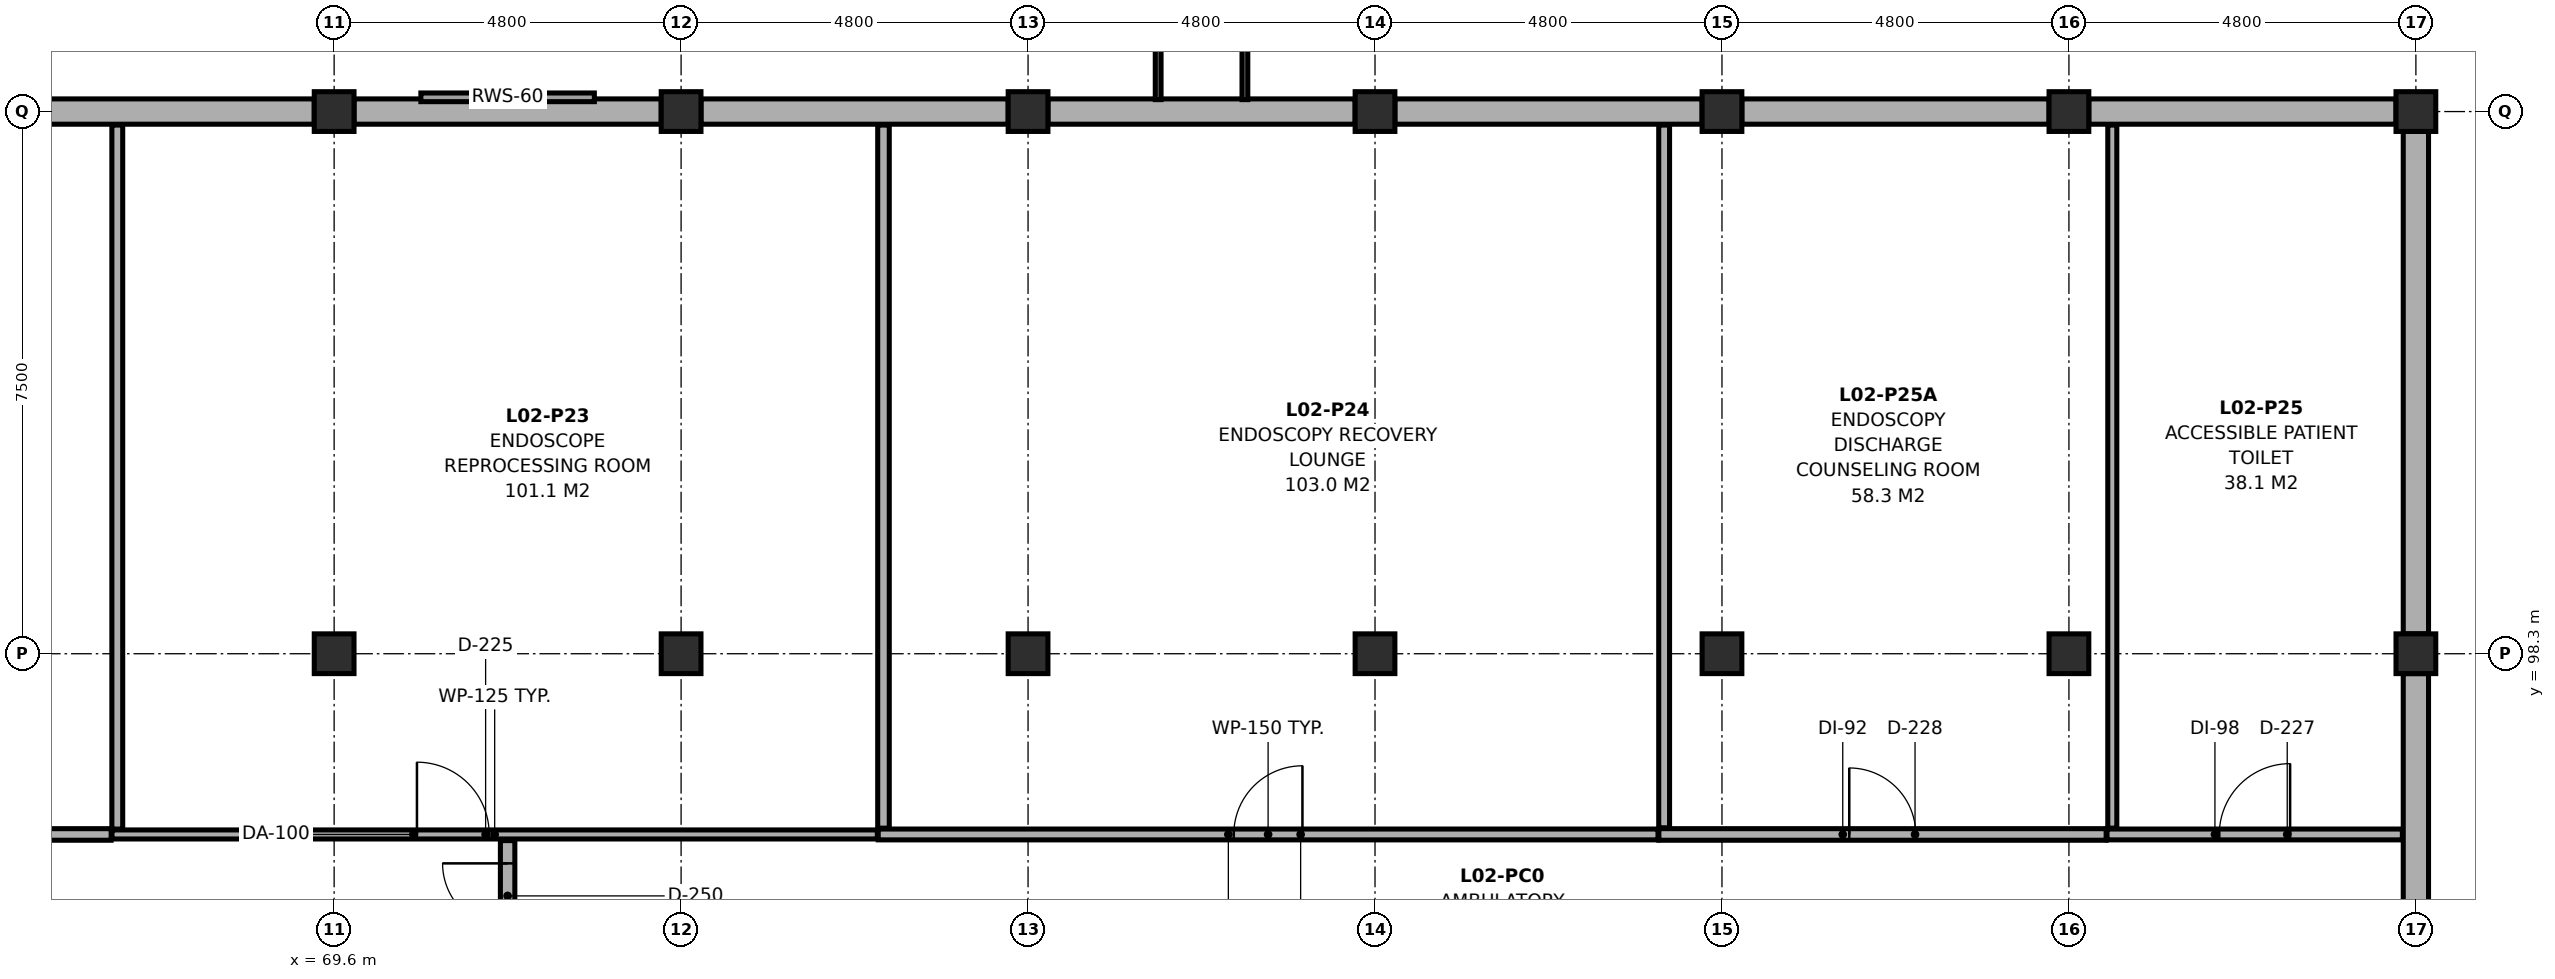
"""IFC4 building model, lengths in metres.
Left out: names, types, materials, properties, quantities, classifications, styles, units other than length and angle.
Written with IfcOpenShell. Run it as: python <this file> out.ifc"""

import sys

from ifc_helpers import new_model, si_unit, direction, frame, frame_2d, origin, origin_2d, place, context, subcontext, project, spatial, rectangle, extrude, element, fill, save


model = new_model("IFC4")
c1 = context("Model", 3, precision=1e-05, world=origin(), true_north=direction((0.0, 1.0)))
c2 = subcontext(c1, "Body", "Model", "MODEL_VIEW")
j1 = project(units=[si_unit("LENGTHUNIT", "METRE"), si_unit("PLANEANGLEUNIT", "RADIAN")], contexts=[c1])
p1 = place(None, origin())
s1 = spatial("IfcSite", under=j1, at=p1, CompositionType="ELEMENT")
p2 = place(p1, origin())
s2 = spatial("IfcBuilding", under=s1, at=p2, CompositionType="ELEMENT")
p3 = place(p2, frame((0.0, 0.0, 9.5)))
s3 = spatial("IfcBuildingStorey", under=s2, at=p3, CompositionType="ELEMENT", Elevation=9.5)
p4 = place(p3, frame((69.6, 98.3, 0.0), z_axis=(0.0, 0.0, 1.0), x_axis=(1.0, 0.0, 0.0)))
e1 = element("IfcColumn", 1, at=p4, inside=s3, PredefinedType="COLUMN", context=c2, shape_type="SweptSolid", body=[
    extrude(rectangle(XDim=0.55, YDim=0.55, at=origin_2d()), origin(), (0.0, 0.0, 1.0), 3.7),
])
p5 = place(p3, frame((69.6, 105.8, 0.0), z_axis=(0.0, 0.0, 1.0), x_axis=(1.0, 0.0, 0.0)))
e2 = element("IfcColumn", 2, at=p5, inside=s3, PredefinedType="COLUMN", context=c2, shape_type="SweptSolid", body=[
    extrude(rectangle(XDim=0.55, YDim=0.55, at=origin_2d()), origin(), (0.0, 0.0, 1.0), 3.75),
])
for number, where, z_axis, x_axis in (
    (3, (74.4, 98.3, 0.0), (0.0, 0.0, 1.0), (1.0, 0.0, 0.0)),
    (4, (74.4, 105.8, 0.0), (0.0, 0.0, 1.0), (1.0, 0.0, 0.0)),
    (5, (79.2, 98.3, 0.0), (0.0, 0.0, 1.0), (1.0, 0.0, 0.0)),
    (6, (79.2, 105.8, 0.0), (0.0, 0.0, 1.0), (1.0, 0.0, 0.0)),
    (7, (84.0, 98.3, 0.0), (0.0, 0.0, 1.0), (1.0, 0.0, 0.0)),
    (8, (84.0, 105.8, 0.0), (0.0, 0.0, 1.0), (1.0, 0.0, 0.0)),
    (9, (88.8, 98.3, 0.0), (0.0, 0.0, 1.0), (1.0, 0.0, 0.0)),
    (10, (88.8, 105.8, 0.0), (0.0, 0.0, 1.0), (1.0, 0.0, 0.0)),
    (11, (93.6, 98.3, 0.0), (0.0, 0.0, 1.0), (1.0, 0.0, 0.0)),
    (12, (93.6, 105.8, 0.0), (0.0, 0.0, 1.0), (1.0, 0.0, 0.0)),
    (13, (98.4, 98.3, 0.0), (0.0, 0.0, 1.0), (1.0, 0.0, 0.0)),
    (14, (98.4, 105.8, 0.0), (0.0, 0.0, 1.0), (1.0, 0.0, 0.0)),
):
    element("IfcColumn", number, at=place(p3, frame(where, z_axis=z_axis, x_axis=x_axis)), inside=s3, PredefinedType="COLUMN", context=c2, shape_type="SweptSolid", body=[
        extrude(rectangle(XDim=0.55, YDim=0.55, at=origin_2d()), origin(), (0.0, 0.0, 1.0), 3.7),
    ])
for number, where, z_axis, x_axis in (
    (15, (65.075, 105.8, 0.0), (0.0, 0.0, 1.0), (1.0, 0.0, 0.0)),
    (16, (69.875, 105.8, 0.0), (0.0, 0.0, 1.0), (1.0, 0.0, 0.0)),
    (17, (74.675, 105.8, 0.0), (0.0, 0.0, 1.0), (1.0, 0.0, 0.0)),
    (18, (79.475, 105.8, 0.0), (0.0, 0.0, 1.0), (1.0, 0.0, 0.0)),
    (19, (84.275, 105.8, 0.0), (0.0, 0.0, 1.0), (1.0, 0.0, 0.0)),
    (20, (89.075, 105.8, 0.0), (0.0, 0.0, 1.0), (1.0, 0.0, 0.0)),
    (21, (93.875, 105.8, 0.0), (0.0, 0.0, 1.0), (1.0, 0.0, 0.0)),
):
    element("IfcWall", number, at=place(p3, frame(where, z_axis=z_axis, x_axis=x_axis)), inside=s3, PredefinedType="SOLIDWALL", context=c2, shape_type="SweptSolid", body=[
        extrude(rectangle(XDim=4.25, YDim=0.35, at=frame_2d((2.125, 0.0))), origin(), (0.0, 0.0, 1.0), 2.985),
    ])
for number, where, z_axis, x_axis in (
    (22, (98.4, 105.525, 0.0), (0.0, 0.0, 1.0), (0.0, -1.0, 0.0)),
    (23, (98.4, 98.025, 0.0), (0.0, 0.0, 1.0), (0.0, -1.0, 0.0)),
):
    element("IfcWall", number, at=place(p3, frame(where, z_axis=z_axis, x_axis=x_axis)), inside=s3, PredefinedType="SOLIDWALL", context=c2, shape_type="SweptSolid", body=[
        extrude(rectangle(XDim=6.95, YDim=0.35, at=frame_2d((3.475, 0.0))), origin(), (0.0, 0.0, 1.0), 3.035),
    ])
p6 = place(p3, frame((72.0, 93.285, 0.0), z_axis=(0.0, 0.0, 1.0), x_axis=(0.0, 1.0, 0.0)))
e24 = element("IfcWall", 24, at=p6, inside=s3, PredefinedType="PARTITIONING", context=c2, shape_type="SweptSolid", body=[
    extrude(rectangle(XDim=2.43, YDim=0.2, at=frame_2d((1.215, 0.0))), origin(), (0.0, 0.0, 1.0), 3.7),
])
p7 = place(p6, frame((0.315, 0.0, 0.0)))
e25 = element("IfcOpeningElement", 25, at=p7, cuts=e24, PredefinedType="OPENING", context=c2, shape_type="SweptSolid", body=[
    extrude(rectangle(XDim=1.8, YDim=2.15, at=frame_2d((0.9, 1.075))), frame((0.0, 0.112, 0.0), z_axis=(0.0, -1.0, 0.0), x_axis=(1.0, 0.0, 0.0)), (0.0, 0.0, 1.0), 0.224),
])
p8 = place(p3, frame((55.927, 95.8, 0.0), z_axis=(0.0, 0.0, 1.0), x_axis=(1.0, 0.0, 0.0)))
e26 = element("IfcWall", 26, at=p8, inside=s3, PredefinedType="PARTITIONING", context=c2, shape_type="SweptSolid", body=[
    extrude(rectangle(XDim=10.588, YDim=0.16, at=frame_2d((5.294, 0.0))), origin(), (0.0, 0.0, 1.0), 2.985),
])
p9 = place(p8, frame((4.694, 0.0, 0.0)))
e27 = element("IfcOpeningElement", 27, at=p9, cuts=e26, PredefinedType="OPENING", context=c2, shape_type="SweptSolid", body=[
    extrude(rectangle(XDim=1.2, YDim=2.15, at=frame_2d((0.6, 1.075))), frame((0.0, 0.092, 0.0), z_axis=(0.0, -1.0, 0.0), x_axis=(1.0, 0.0, 0.0)), (0.0, 0.0, 1.0), 0.184),
])
p10 = place(p3, frame((66.527, 95.8, 0.0), z_axis=(0.0, 0.0, 1.0), x_axis=(1.0, 0.0, 0.0)))
e28 = element("IfcWall", 28, at=p10, inside=s3, PredefinedType="PARTITIONING", context=c2, shape_type="SweptSolid", body=[
    extrude(rectangle(XDim=10.588, YDim=0.125, at=frame_2d((5.294, 0.0))), origin(), (0.0, 0.0, 1.0), 2.985),
])
p11 = place(p10, frame((4.219, 0.0, 0.0)))
e29 = element("IfcOpeningElement", 29, at=p11, cuts=e28, PredefinedType="OPENING", context=c2, shape_type="SweptSolid", body=[
    extrude(rectangle(XDim=1.0, YDim=2.22, at=frame_2d((0.5, 1.11))), frame((0.0, 0.074, 0.0), z_axis=(0.0, -1.0, 0.0), x_axis=(1.0, 0.0, 0.0)), (0.0, 0.0, 1.0), 0.149),
])
p12 = place(p3, frame((77.127, 95.8, 0.0), z_axis=(0.0, 0.0, 1.0), x_axis=(1.0, 0.0, 0.0)))
e30 = element("IfcWall", 30, at=p12, inside=s3, PredefinedType="PARTITIONING", context=c2, shape_type="SweptSolid", body=[
    extrude(rectangle(XDim=10.788, YDim=0.15, at=frame_2d((5.394, 0.0))), origin(), (0.0, 0.0, 1.0), 2.985),
])
p13 = place(p12, frame((4.919, 0.0, 0.0)))
e31 = element("IfcOpeningElement", 31, at=p13, cuts=e30, PredefinedType="OPENING", context=c2, shape_type="SweptSolid", body=[
    extrude(rectangle(XDim=0.95, YDim=2.15, at=frame_2d((0.475, 1.075))), frame((0.0, 0.087, 0.0), z_axis=(0.0, -1.0, 0.0), x_axis=(1.0, 0.0, 0.0)), (0.0, 0.0, 1.0), 0.174),
])
p14 = place(p3, frame((87.927, 95.8, 0.0), z_axis=(0.0, 0.0, 1.0), x_axis=(1.0, 0.0, 0.0)))
e32 = element("IfcWall", 32, at=p14, inside=s3, PredefinedType="PARTITIONING", context=c2, shape_type="SweptSolid", body=[
    extrude(rectangle(XDim=6.188, YDim=0.16, at=frame_2d((3.094, 0.0))), origin(), (0.0, 0.0, 1.0), 2.985),
])
p15 = place(p14, frame((2.634, 0.0, 0.0)))
e33 = element("IfcOpeningElement", 33, at=p15, cuts=e32, PredefinedType="OPENING", context=c2, shape_type="SweptSolid", body=[
    extrude(rectangle(XDim=0.92, YDim=2.1, at=frame_2d((0.46, 1.05))), frame((0.0, 0.092, 0.0), z_axis=(0.0, -1.0, 0.0), x_axis=(1.0, 0.0, 0.0)), (0.0, 0.0, 1.0), 0.184),
])
p16 = place(p3, frame((94.127, 95.8, 0.0), z_axis=(0.0, 0.0, 1.0), x_axis=(1.0, 0.0, 0.0)))
e34 = element("IfcWall", 34, at=p16, inside=s3, PredefinedType="PARTITIONING", context=c2, shape_type="SweptSolid", body=[
    extrude(rectangle(XDim=4.086, YDim=0.15, at=frame_2d((2.043, 0.0))), origin(), (0.0, 0.0, 1.0), 3.035),
])
p17 = place(p16, frame((1.553, 0.0, 0.0)))
e35 = element("IfcOpeningElement", 35, at=p17, cuts=e34, PredefinedType="OPENING", context=c2, shape_type="SweptSolid", body=[
    extrude(rectangle(XDim=0.98, YDim=2.12, at=frame_2d((0.49, 1.06))), frame((0.0, 0.087, 0.0), z_axis=(0.0, -1.0, 0.0), x_axis=(1.0, 0.0, 0.0)), (0.0, 0.0, 1.0), 0.174),
])
p18 = place(p3, frame((66.6, 95.875, 0.0), z_axis=(0.0, 0.0, 1.0), x_axis=(0.0, 1.0, 0.0)))
e36 = element("IfcWall", 36, at=p18, inside=s3, PredefinedType="PARTITIONING", context=c2, shape_type="SweptSolid", body=[
    extrude(rectangle(XDim=9.739, YDim=0.15, at=frame_2d((4.869, 0.0))), origin(), (0.0, 0.0, 1.0), 3.085),
])
p19 = place(p3, frame((77.2, 95.887, 0.0), z_axis=(0.0, 0.0, 1.0), x_axis=(0.0, 1.0, 0.0)))
e37 = element("IfcWall", 37, at=p19, inside=s3, PredefinedType="PARTITIONING", context=c2, shape_type="SweptSolid", body=[
    extrude(rectangle(XDim=9.726, YDim=0.16, at=frame_2d((4.863, 0.0))), origin(), (0.0, 0.0, 1.0), 3.035),
])
p20 = place(p3, frame((88.0, 95.892, 0.0), z_axis=(0.0, 0.0, 1.0), x_axis=(0.0, 1.0, 0.0)))
e38 = element("IfcWall", 38, at=p20, inside=s3, PredefinedType="PARTITIONING", context=c2, shape_type="SweptSolid", body=[
    extrude(rectangle(XDim=9.721, YDim=0.15, at=frame_2d((4.86, 0.0))), origin(), (0.0, 0.0, 1.0), 3.035),
])
p21 = place(p3, frame((94.2, 95.887, 0.0), z_axis=(0.0, 0.0, 1.0), x_axis=(0.0, 1.0, 0.0)))
e39 = element("IfcWall", 39, at=p21, inside=s3, PredefinedType="PARTITIONING", context=c2, shape_type="SweptSolid", body=[
    extrude(rectangle(XDim=9.726, YDim=0.125, at=frame_2d((4.863, 0.0))), origin(), (0.0, 0.0, 1.0), 3.035),
])
p22 = place(p7, origin())
e40 = element("IfcDoor", 40, at=p22, inside=s3, OperationType="DOUBLE_DOOR_SINGLE_SWING", PredefinedType="DOOR", context=c2, shape_type="SweptSolid", body=[
    extrude(rectangle(XDim=1.8, YDim=2.15, at=frame_2d((0.9, 1.075))), frame((0.0, 0.025, 0.0), z_axis=(0.0, -1.0, 0.0), x_axis=(1.0, 0.0, 0.0)), (0.0, 0.0, 1.0), 0.05),
])
fill(e25, e40)
p23 = place(p11, origin())
e41 = element("IfcDoor", 41, at=p23, inside=s3, OperationType="SINGLE_SWING_LEFT", PredefinedType="DOOR", context=c2, shape_type="SweptSolid", body=[
    extrude(rectangle(XDim=1.0, YDim=2.22, at=frame_2d((0.5, 1.11))), frame((0.0, 0.025, 0.0), z_axis=(0.0, -1.0, 0.0), x_axis=(1.0, 0.0, 0.0)), (0.0, 0.0, 1.0), 0.05),
])
fill(e29, e41)
p24 = place(p13, origin())
e42 = element("IfcDoor", 42, at=p24, inside=s3, OperationType="SINGLE_SWING_RIGHT", PredefinedType="DOOR", context=c2, shape_type="SweptSolid", body=[
    extrude(rectangle(XDim=0.95, YDim=2.15, at=frame_2d((0.475, 1.075))), frame((0.0, 0.025, 0.0), z_axis=(0.0, -1.0, 0.0), x_axis=(1.0, 0.0, 0.0)), (0.0, 0.0, 1.0), 0.05),
])
fill(e31, e42)
p25 = place(p15, origin())
e43 = element("IfcDoor", 43, at=p25, inside=s3, OperationType="SINGLE_SWING_LEFT", PredefinedType="DOOR", context=c2, shape_type="SweptSolid", body=[
    extrude(rectangle(XDim=0.92, YDim=2.1, at=frame_2d((0.46, 1.05))), frame((0.0, 0.025, 0.0), z_axis=(0.0, -1.0, 0.0), x_axis=(1.0, 0.0, 0.0)), (0.0, 0.0, 1.0), 0.05),
])
fill(e33, e43)
p26 = place(p17, origin())
e44 = element("IfcDoor", 44, at=p26, inside=s3, OperationType="SINGLE_SWING_RIGHT", PredefinedType="DOOR", context=c2, shape_type="SweptSolid", body=[
    extrude(rectangle(XDim=0.98, YDim=2.12, at=frame_2d((0.49, 1.06))), frame((0.0, 0.025, 0.0), z_axis=(0.0, -1.0, 0.0), x_axis=(1.0, 0.0, 0.0)), (0.0, 0.0, 1.0), 0.05),
])
fill(e35, e44)
save(model, sys.argv[1])
